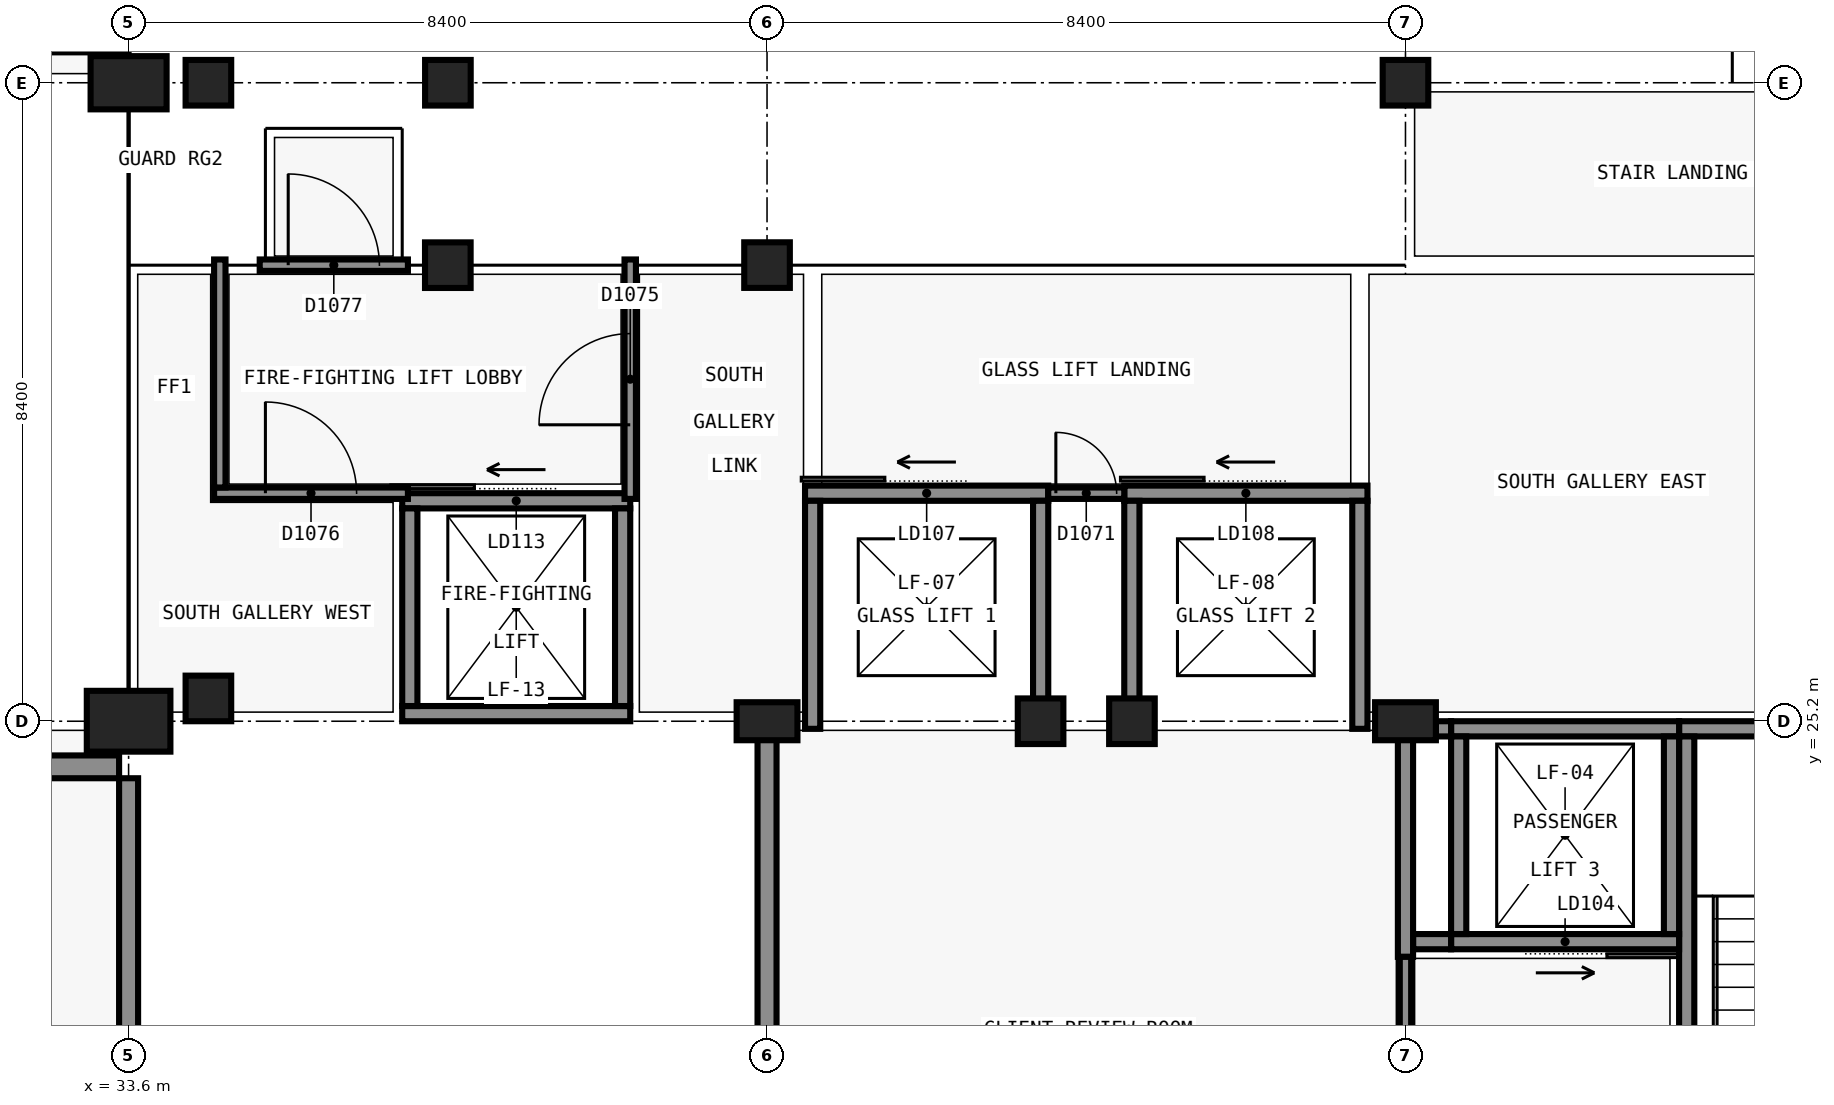
"""IFC4 building model, lengths in metres.
Left out: names, types, materials, properties, quantities, classifications, styles, units other than length and angle.
Written with IfcOpenShell. Run it as: python <this file> out.ifc"""

import sys

from ifc_helpers import new_model, si_unit, direction, frame, frame_2d, origin, origin_2d, place, context, subcontext, project, spatial, rectangle, extrude, element, fill, save


model = new_model("IFC4")
c1 = context("Model", 3, precision=1e-05, world=origin(), true_north=direction((0.0, 1.0)))
c2 = subcontext(c1, "Body", "Model", "MODEL_VIEW")
j1 = project(units=[si_unit("LENGTHUNIT", "METRE"), si_unit("PLANEANGLEUNIT", "RADIAN")], contexts=[c1])
p1 = place(None, origin())
s1 = spatial("IfcSite", under=j1, at=p1, CompositionType="ELEMENT")
p2 = place(p1, origin())
s2 = spatial("IfcBuilding", under=s1, at=p2, CompositionType="ELEMENT")
p3 = place(p2, frame((0.0, 0.0, 5.4)))
s3 = spatial("IfcBuildingStorey", under=s2, at=p3, CompositionType="ELEMENT", Elevation=5.4)
p4 = place(p3, frame((54.0, 25.1, 0.0), z_axis=(0.0, 0.0, 1.0), x_axis=(1.0, 0.0, 0.0)))
e1 = element("IfcWall", 1, at=p4, inside=s3, PredefinedType="SHEAR", context=c2, shape_type="SweptSolid", body=[
    extrude(rectangle(XDim=4.8, YDim=0.2, at=frame_2d((2.4, 0.0))), origin(), (0.0, 0.0, 1.0), 4.8),
])
p5 = place(p3, frame((54.1, 15.8, 0.0), z_axis=(0.0, 0.0, 1.0), x_axis=(0.0, 1.0, 0.0)))
e2 = element("IfcWall", 2, at=p5, inside=s3, PredefinedType="SHEAR", context=c2, shape_type="SweptSolid", body=[
    extrude(rectangle(XDim=9.2, YDim=0.2, at=frame_2d((4.6, 0.0))), origin(), (0.0, 0.0, 1.0), 4.8),
])
p6 = place(p5, frame((0.5, 0.0, 0.0)))
e3 = element("IfcOpeningElement", 3, at=p6, cuts=e2, PredefinedType="OPENING", context=c2, shape_type="SweptSolid", body=[
    extrude(rectangle(XDim=1.2, YDim=2.1, at=frame_2d((0.6, 1.05))), frame((0.0, 0.11, 0.0), z_axis=(0.0, -1.0, 0.0), x_axis=(1.0, 0.0, 0.0)), (0.0, 0.0, 1.0), 0.22),
])
p7 = place(p3, frame((54.0, 22.3, 0.0), z_axis=(0.0, 0.0, 1.0), x_axis=(-1.0, 0.0, 0.0)))
e4 = element("IfcWall", 4, at=p7, inside=s3, PredefinedType="SHEAR", context=c2, shape_type="SweptSolid", body=[
    extrude(rectangle(XDim=3.0, YDim=0.2, at=frame_2d((1.5, 0.0))), origin(), (0.0, 0.0, 1.0), 4.8),
])
p8 = place(p7, frame((0.95, 0.0, 0.0)))
e5 = element("IfcOpeningElement", 5, at=p8, cuts=e4, PredefinedType="OPENING", context=c2, shape_type="SweptSolid", body=[
    extrude(rectangle(XDim=1.1, YDim=2.1, at=frame_2d((0.55, 1.05))), frame((0.0, 0.11, 0.0), z_axis=(0.0, -1.0, 0.0), x_axis=(1.0, 0.0, 0.0)), (0.0, 0.0, 1.0), 0.22),
])
p9 = place(p3, frame((51.0, 25.1, 0.0), z_axis=(0.0, 0.0, 1.0), x_axis=(1.0, 0.0, 0.0)))
e6 = element("IfcWall", 6, at=p9, inside=s3, PredefinedType="SHEAR", context=c2, shape_type="SweptSolid", body=[
    extrude(rectangle(XDim=3.0, YDim=0.2, at=frame_2d((1.5, 0.0))), origin(), (0.0, 0.0, 1.0), 4.8),
])
for number, where, z_axis, x_axis in (
    (7, (51.1, 22.4, 0.0), (0.0, 0.0, 1.0), (0.0, 1.0, 0.0)),
    (8, (53.9, 25.0, 0.0), (0.0, 0.0, 1.0), (0.0, -1.0, 0.0)),
):
    element("IfcWall", number, at=place(p3, frame(where, z_axis=z_axis, x_axis=x_axis)), inside=s3, PredefinedType="SHEAR", context=c2, shape_type="SweptSolid", body=[
        extrude(rectangle(XDim=2.6, YDim=0.2, at=frame_2d((1.3, 0.0))), origin(), (0.0, 0.0, 1.0), 4.8),
    ])
p10 = place(p3, frame((40.2, 25.3, 0.0), z_axis=(0.0, 0.0, 1.0), x_axis=(-1.0, 0.0, 0.0)))
e9 = element("IfcWall", 9, at=p10, inside=s3, PredefinedType="SHEAR", context=c2, shape_type="SweptSolid", body=[
    extrude(rectangle(XDim=3.0, YDim=0.2, at=frame_2d((1.5, 0.0))), origin(), (0.0, 0.0, 1.0), 4.8),
])
p11 = place(p3, frame((37.2, 28.1, 0.0), z_axis=(0.0, 0.0, 1.0), x_axis=(1.0, 0.0, 0.0)))
e10 = element("IfcWall", 10, at=p11, inside=s3, PredefinedType="SHEAR", context=c2, shape_type="SweptSolid", body=[
    extrude(rectangle(XDim=3.0, YDim=0.2, at=frame_2d((1.5, 0.0))), origin(), (0.0, 0.0, 1.0), 4.8),
])
p12 = place(p11, frame((0.95, 0.0, 0.0)))
e11 = element("IfcOpeningElement", 11, at=p12, cuts=e10, PredefinedType="OPENING", context=c2, shape_type="SweptSolid", body=[
    extrude(rectangle(XDim=1.1, YDim=2.1, at=frame_2d((0.55, 1.05))), frame((0.0, 0.11, 0.0), z_axis=(0.0, -1.0, 0.0), x_axis=(1.0, 0.0, 0.0)), (0.0, 0.0, 1.0), 0.22),
])
for number, where, z_axis, x_axis in (
    (12, (37.3, 25.4, 0.0), (0.0, 0.0, 1.0), (0.0, 1.0, 0.0)),
    (13, (40.1, 28.0, 0.0), (0.0, 0.0, 1.0), (0.0, -1.0, 0.0)),
):
    element("IfcWall", number, at=place(p3, frame(where, z_axis=z_axis, x_axis=x_axis)), inside=s3, PredefinedType="SHEAR", context=c2, shape_type="SweptSolid", body=[
        extrude(rectangle(XDim=2.6, YDim=0.2, at=frame_2d((1.3, 0.0))), origin(), (0.0, 0.0, 1.0), 4.8),
    ])
p13 = place(p3, frame((33.6, 25.2, 0.0), z_axis=(0.0, 0.0, 1.0), x_axis=(1.0, 0.0, 0.0)))
e14 = element("IfcColumn", 14, at=p13, inside=s3, PredefinedType="COLUMN", context=c2, shape_type="SweptSolid", body=[
    extrude(rectangle(XDim=1.1, YDim=0.8, at=origin_2d()), origin(), (0.0, 0.0, 1.0), 4.8),
])
for number, where, z_axis, x_axis in (
    (15, (42.0, 25.2, 0.0), (0.0, 0.0, 1.0), (1.0, 0.0, 0.0)),
    (16, (50.4, 25.2, 0.0), (0.0, 0.0, 1.0), (1.0, 0.0, 0.0)),
):
    element("IfcColumn", number, at=place(p3, frame(where, z_axis=z_axis, x_axis=x_axis)), inside=s3, PredefinedType="COLUMN", context=c2, shape_type="SweptSolid", body=[
        extrude(rectangle(XDim=0.8, YDim=0.5, at=origin_2d()), origin(), (0.0, 0.0, 1.0), 4.8),
    ])
p14 = place(p3, frame((33.6, 33.6, 0.0), z_axis=(0.0, 0.0, 1.0), x_axis=(1.0, 0.0, 0.0)))
e17 = element("IfcColumn", 17, at=p14, inside=s3, PredefinedType="COLUMN", context=c2, shape_type="SweptSolid", body=[
    extrude(rectangle(XDim=1.0, YDim=0.7, at=origin_2d()), origin(), (0.0, 0.0, 1.0), 4.8),
])
for number, where, z_axis, x_axis in (
    (18, (50.4, 33.6, 0.0), (0.0, 0.0, 1.0), (1.0, 0.0, 0.0)),
    (19, (34.65, 25.5, 0.0), (0.0, 0.0, 1.0), (1.0, 0.0, 0.0)),
    (20, (34.65, 33.6, 0.0), (0.0, 0.0, 1.0), (1.0, 0.0, 0.0)),
):
    element("IfcColumn", number, at=place(p3, frame(where, z_axis=z_axis, x_axis=x_axis)), inside=s3, PredefinedType="COLUMN", context=c2, shape_type="SweptSolid", body=[
        extrude(rectangle(XDim=0.6, YDim=0.6, at=origin_2d()), origin(), (0.0, 0.0, 1.0), 4.8),
    ])
p15 = place(p3, frame((51.0, 22.3, 0.0), z_axis=(0.0, 0.0, 1.0), x_axis=(-1.0, 0.0, 0.0)))
e21 = element("IfcWall", 21, at=p15, inside=s3, PredefinedType="SHEAR", context=c2, shape_type="SweptSolid", body=[
    extrude(rectangle(XDim=0.5, YDim=0.2, at=frame_2d((0.25, 0.0))), origin(), (0.0, 0.0, 1.0), 4.8),
])
p16 = place(p3, frame((50.8, 25.1, 0.0), z_axis=(0.0, 0.0, 1.0), x_axis=(1.0, 0.0, 0.0)))
e22 = element("IfcWall", 22, at=p16, inside=s3, PredefinedType="SHEAR", context=c2, shape_type="SweptSolid", body=[
    extrude(rectangle(XDim=0.2, YDim=0.2, at=frame_2d((0.1, 0.0))), origin(), (0.0, 0.0, 1.0), 4.8),
])
for number, where, z_axis, x_axis in (
    (23, (37.8, 31.2, 0.0), (0.0, 0.0, 1.0), (1.0, 0.0, 0.0)),
    (24, (37.801, 33.6, 0.0), (0.0, 0.0, 1.0), (1.0, 0.0, 0.0)),
    (25, (45.599, 25.2, 0.0), (0.0, 0.0, 1.0), (1.0, 0.0, 0.0)),
    (26, (46.801, 25.2, 0.0), (0.0, 0.0, 1.0), (1.0, 0.0, 0.0)),
    (27, (42.0, 31.201, 0.0), (0.0, 0.0, 1.0), (1.0, 0.0, 0.0)),
):
    element("IfcColumn", number, at=place(p3, frame(where, z_axis=z_axis, x_axis=x_axis)), inside=s3, PredefinedType="COLUMN", context=c2, shape_type="SweptSolid", body=[
        extrude(rectangle(XDim=0.6, YDim=0.6, at=origin_2d()), origin(), (0.0, 0.0, 1.0), 4.8),
    ])
p17 = place(p3, frame((29.051, 24.6, 0.0), z_axis=(0.0, 0.0, 1.0), x_axis=(1.0, 0.0, 0.0)))
e28 = element("IfcWall", 28, at=p17, inside=s3, PredefinedType="SOLIDWALL", context=c2, shape_type="SweptSolid", body=[
    extrude(rectangle(XDim=4.425, YDim=0.3, at=frame_2d((2.212, 0.0))), origin(), (0.0, 0.0, 1.0), 4.5),
])
p18 = place(p17, frame((0.775, 0.0, 0.9)))
e29 = element("IfcOpeningElement", 29, at=p18, cuts=e28, PredefinedType="OPENING", context=c2, shape_type="SweptSolid", body=[
    extrude(rectangle(XDim=2.4, YDim=1.5, at=frame_2d((1.2, 0.75))), frame((0.0, 0.16, 0.0), z_axis=(0.0, -1.0, 0.0), x_axis=(1.0, 0.0, 0.0)), (0.0, 0.0, 1.0), 0.32),
])
p19 = place(p3, frame((33.6, 34.15, 0.0), z_axis=(0.0, 0.0, 1.0), x_axis=(-1.0, 0.0, 0.0)))
e30 = element("IfcWall", 30, at=p19, inside=s3, PredefinedType="SOLIDWALL", context=c2, shape_type="SweptSolid", body=[
    extrude(rectangle(XDim=4.536, YDim=0.3, at=frame_2d((2.268, 0.0))), origin(), (0.0, 0.0, 1.0), 4.5),
])
p20 = place(p19, frame((1.5, 0.0, 1.5)))
e31 = element("IfcOpeningElement", 31, at=p20, cuts=e30, PredefinedType="OPENING", context=c2, shape_type="SweptSolid", body=[
    extrude(rectangle(XDim=1.2, YDim=0.9, at=frame_2d((0.6, 0.45))), frame((0.0, 0.16, 0.0), z_axis=(0.0, -1.0, 0.0), x_axis=(1.0, 0.0, 0.0)), (0.0, 0.0, 1.0), 0.32),
])
p21 = place(p3, frame((33.6, 8.6, 0.0), z_axis=(0.0, 0.0, 1.0), x_axis=(0.0, 1.0, 0.0)))
e32 = element("IfcWall", 32, at=p21, inside=s3, PredefinedType="SOLIDWALL", context=c2, shape_type="SweptSolid", body=[
    extrude(rectangle(XDim=15.85, YDim=0.25, at=frame_2d((7.925, 0.0))), origin(), (0.0, 0.0, 1.0), 3.8),
])
p22 = place(p3, frame((42.0, 16.925, 0.0), z_axis=(0.0, 0.0, 1.0), x_axis=(0.0, 1.0, 0.0)))
e33 = element("IfcWall", 33, at=p22, inside=s3, PredefinedType="PARTITIONING", context=c2, shape_type="SweptSolid", body=[
    extrude(rectangle(XDim=8.4, YDim=0.25, at=frame_2d((4.2, 0.0))), origin(), (0.0, 0.0, 1.0), 3.8),
])
p23 = place(p3, frame((42.5, 28.2, 0.0), z_axis=(0.0, 0.0, 1.0), x_axis=(1.0, 0.0, 0.0)))
e34 = element("IfcWall", 34, at=p23, inside=s3, PredefinedType="SHEAR", context=c2, shape_type="SweptSolid", body=[
    extrude(rectangle(XDim=3.2, YDim=0.2, at=frame_2d((1.6, 0.0))), origin(), (0.0, 0.0, 1.0), 4.5),
])
p24 = place(p23, frame((1.05, 0.0, 0.0)))
e35 = element("IfcOpeningElement", 35, at=p24, cuts=e34, PredefinedType="OPENING", context=c2, shape_type="SweptSolid", body=[
    extrude(rectangle(XDim=1.1, YDim=2.1, at=frame_2d((0.55, 1.05))), frame((0.0, 0.11, 0.0), z_axis=(0.0, -1.0, 0.0), x_axis=(1.0, 0.0, 0.0)), (0.0, 0.0, 1.0), 0.22),
])
p25 = place(p3, frame((46.7, 28.2, 0.0), z_axis=(0.0, 0.0, 1.0), x_axis=(1.0, 0.0, 0.0)))
e36 = element("IfcWall", 36, at=p25, inside=s3, PredefinedType="SHEAR", context=c2, shape_type="SweptSolid", body=[
    extrude(rectangle(XDim=3.2, YDim=0.2, at=frame_2d((1.6, 0.0))), origin(), (0.0, 0.0, 1.0), 4.5),
])
p26 = place(p25, frame((1.05, 0.0, 0.0)))
e37 = element("IfcOpeningElement", 37, at=p26, cuts=e36, PredefinedType="OPENING", context=c2, shape_type="SweptSolid", body=[
    extrude(rectangle(XDim=1.1, YDim=2.1, at=frame_2d((0.55, 1.05))), frame((0.0, 0.11, 0.0), z_axis=(0.0, -1.0, 0.0), x_axis=(1.0, 0.0, 0.0)), (0.0, 0.0, 1.0), 0.22),
])
for number, where, z_axis, x_axis in (
    (38, (42.6, 25.1, 0.0), (0.0, 0.0, 1.0), (0.0, 1.0, 0.0)),
    (39, (45.6, 25.1, 0.0), (0.0, 0.0, 1.0), (0.0, 1.0, 0.0)),
    (40, (46.8, 25.1, 0.0), (0.0, 0.0, 1.0), (0.0, 1.0, 0.0)),
    (41, (49.8, 25.1, 0.0), (0.0, 0.0, 1.0), (0.0, 1.0, 0.0)),
):
    element("IfcWall", number, at=place(p3, frame(where, z_axis=z_axis, x_axis=x_axis)), inside=s3, PredefinedType="SHEAR", context=c2, shape_type="SweptSolid", body=[
        extrude(rectangle(XDim=3.0, YDim=0.2, at=frame_2d((1.5, 0.0))), origin(), (0.0, 0.0, 1.0), 4.5),
    ])
p27 = place(p3, frame((50.4, 22.1, 0.0), z_axis=(0.0, 0.0, 1.0), x_axis=(0.0, 1.0, 0.0)))
e42 = element("IfcWall", 42, at=p27, inside=s3, PredefinedType="SHEAR", context=c2, shape_type="SweptSolid", body=[
    extrude(rectangle(XDim=3.2, YDim=0.2, at=frame_2d((1.6, 0.0))), origin(), (0.0, 0.0, 1.0), 4.5),
])
p28 = place(p3, frame((34.725, 28.2, 0.0), z_axis=(0.0, 0.0, 1.0), x_axis=(1.0, 0.0, 0.0)))
e43 = element("IfcWall", 43, at=p28, inside=s3, PredefinedType="SOLIDWALL", context=c2, shape_type="SweptSolid", body=[
    extrude(rectangle(XDim=2.55, YDim=0.15, at=frame_2d((1.275, 0.0))), origin(), (0.0, 0.0, 1.0), 4.5),
])
p29 = place(p28, frame((0.675, 0.0, 0.0)))
e44 = element("IfcOpeningElement", 44, at=p29, cuts=e43, PredefinedType="OPENING", context=c2, shape_type="SweptSolid", body=[
    extrude(rectangle(XDim=1.2, YDim=2.1, at=frame_2d((0.6, 1.05))), frame((0.0, 0.085, 0.0), z_axis=(0.0, -1.0, 0.0), x_axis=(1.0, 0.0, 0.0)), (0.0, 0.0, 1.0), 0.17),
])
p30 = place(p3, frame((35.325, 31.2, 0.0), z_axis=(0.0, 0.0, 1.0), x_axis=(1.0, 0.0, 0.0)))
e45 = element("IfcWall", 45, at=p30, inside=s3, PredefinedType="SOLIDWALL", context=c2, shape_type="SweptSolid", body=[
    extrude(rectangle(XDim=1.95, YDim=0.15, at=frame_2d((0.975, 0.0))), origin(), (0.0, 0.0, 1.0), 4.5),
])
p31 = place(p30, frame((0.375, 0.0, 0.0)))
e46 = element("IfcOpeningElement", 46, at=p31, cuts=e45, PredefinedType="OPENING", context=c2, shape_type="SweptSolid", body=[
    extrude(rectangle(XDim=1.2, YDim=2.1, at=frame_2d((0.6, 1.05))), frame((0.0, 0.085, 0.0), z_axis=(0.0, -1.0, 0.0), x_axis=(1.0, 0.0, 0.0)), (0.0, 0.0, 1.0), 0.17),
])
p32 = place(p3, frame((45.7, 28.2, 0.0), z_axis=(0.0, 0.0, 1.0), x_axis=(1.0, 0.0, 0.0)))
e47 = element("IfcWall", 47, at=p32, inside=s3, PredefinedType="SOLIDWALL", context=c2, shape_type="SweptSolid", body=[
    extrude(rectangle(XDim=1.0, YDim=0.15, at=frame_2d((0.5, 0.0))), origin(), (0.0, 0.0, 1.0), 4.5),
])
p33 = place(p32, frame((0.1, 0.0, 0.0)))
e48 = element("IfcOpeningElement", 48, at=p33, cuts=e47, PredefinedType="OPENING", context=c2, shape_type="SweptSolid", body=[
    extrude(rectangle(XDim=0.8, YDim=2.1, at=frame_2d((0.4, 1.05))), frame((0.0, 0.085, 0.0), z_axis=(0.0, -1.0, 0.0), x_axis=(1.0, 0.0, 0.0)), (0.0, 0.0, 1.0), 0.17),
])
p34 = place(p3, frame((34.8, 28.275, 0.0), z_axis=(0.0, 0.0, 1.0), x_axis=(0.0, 1.0, 0.0)))
e49 = element("IfcWall", 49, at=p34, inside=s3, PredefinedType="SOLIDWALL", context=c2, shape_type="SweptSolid", body=[
    extrude(rectangle(XDim=3.0, YDim=0.15, at=frame_2d((1.5, 0.0))), origin(), (0.0, 0.0, 1.0), 4.5),
])
p35 = place(p3, frame((40.2, 28.125, 0.0), z_axis=(0.0, 0.0, 1.0), x_axis=(0.0, 1.0, 0.0)))
e50 = element("IfcWall", 50, at=p35, inside=s3, PredefinedType="SOLIDWALL", context=c2, shape_type="SweptSolid", body=[
    extrude(rectangle(XDim=3.15, YDim=0.15, at=frame_2d((1.575, 0.0))), origin(), (0.0, 0.0, 1.0), 4.0),
])
p36 = place(p35, frame((0.975, 0.0, 0.0)))
e51 = element("IfcOpeningElement", 51, at=p36, cuts=e50, PredefinedType="OPENING", context=c2, shape_type="SweptSolid", body=[
    extrude(rectangle(XDim=1.2, YDim=2.1, at=frame_2d((0.6, 1.05))), frame((0.0, 0.085, 0.0), z_axis=(0.0, -1.0, 0.0), x_axis=(1.0, 0.0, 0.0)), (0.0, 0.0, 1.0), 0.17),
])
p37 = place(p3, frame((50.4, 18.325, 0.0), z_axis=(0.0, 0.0, 1.0), x_axis=(0.0, 1.0, 0.0)))
e52 = element("IfcWall", 52, at=p37, inside=s3, PredefinedType="SOLIDWALL", context=c2, shape_type="SweptSolid", body=[
    extrude(rectangle(XDim=3.775, YDim=0.15, at=frame_2d((1.888, 0.0))), origin(), (0.0, 0.0, 1.0), 3.8),
])
p38 = place(p8, origin())
e53 = element("IfcDoor", 53, at=p38, inside=s3, OperationType="SLIDING_TO_LEFT", PredefinedType="DOOR", context=c2, shape_type="SweptSolid", body=[
    extrude(rectangle(XDim=1.1, YDim=2.1, at=frame_2d((0.55, 1.05))), frame((0.0, 0.025, 0.0), z_axis=(0.0, -1.0, 0.0), x_axis=(1.0, 0.0, 0.0)), (0.0, 0.0, 1.0), 0.05),
])
fill(e5, e53)
p39 = place(p24, origin())
e54 = element("IfcDoor", 54, at=p39, inside=s3, OperationType="SLIDING_TO_LEFT", PredefinedType="DOOR", context=c2, shape_type="SweptSolid", body=[
    extrude(rectangle(XDim=1.1, YDim=2.1, at=frame_2d((0.55, 1.05))), frame((0.0, 0.025, 0.0), z_axis=(0.0, -1.0, 0.0), x_axis=(1.0, 0.0, 0.0)), (0.0, 0.0, 1.0), 0.05),
])
fill(e35, e54)
p40 = place(p26, origin())
e55 = element("IfcDoor", 55, at=p40, inside=s3, OperationType="SLIDING_TO_LEFT", PredefinedType="DOOR", context=c2, shape_type="SweptSolid", body=[
    extrude(rectangle(XDim=1.1, YDim=2.1, at=frame_2d((0.55, 1.05))), frame((0.0, 0.025, 0.0), z_axis=(0.0, -1.0, 0.0), x_axis=(1.0, 0.0, 0.0)), (0.0, 0.0, 1.0), 0.05),
])
fill(e37, e55)
p41 = place(p12, origin())
e56 = element("IfcDoor", 56, at=p41, inside=s3, OperationType="SLIDING_TO_LEFT", PredefinedType="DOOR", context=c2, shape_type="SweptSolid", body=[
    extrude(rectangle(XDim=1.1, YDim=2.1, at=frame_2d((0.55, 1.05))), frame((0.0, 0.025, 0.0), z_axis=(0.0, -1.0, 0.0), x_axis=(1.0, 0.0, 0.0)), (0.0, 0.0, 1.0), 0.05),
])
fill(e11, e56)
p42 = place(p33, origin())
e57 = element("IfcDoor", 57, at=p42, inside=s3, OperationType="SINGLE_SWING_RIGHT", PredefinedType="DOOR", context=c2, shape_type="SweptSolid", body=[
    extrude(rectangle(XDim=0.8, YDim=2.1, at=frame_2d((0.4, 1.05))), frame((0.0, 0.025, 0.0), z_axis=(0.0, -1.0, 0.0), x_axis=(1.0, 0.0, 0.0)), (0.0, 0.0, 1.0), 0.05),
])
fill(e48, e57)
p43 = place(p36, origin())
e58 = element("IfcDoor", 58, at=p43, inside=s3, OperationType="SINGLE_SWING_RIGHT", PredefinedType="DOOR", context=c2, shape_type="SweptSolid", body=[
    extrude(rectangle(XDim=1.2, YDim=2.1, at=frame_2d((0.6, 1.05))), frame((0.0, 0.025, 0.0), z_axis=(0.0, -1.0, 0.0), x_axis=(1.0, 0.0, 0.0)), (0.0, 0.0, 1.0), 0.05),
])
fill(e51, e58)
p44 = place(p29, origin())
e59 = element("IfcDoor", 59, at=p44, inside=s3, OperationType="SINGLE_SWING_RIGHT", PredefinedType="DOOR", context=c2, shape_type="SweptSolid", body=[
    extrude(rectangle(XDim=1.2, YDim=2.1, at=frame_2d((0.6, 1.05))), frame((0.0, 0.025, 0.0), z_axis=(0.0, -1.0, 0.0), x_axis=(1.0, 0.0, 0.0)), (0.0, 0.0, 1.0), 0.05),
])
fill(e44, e59)
p45 = place(p31, origin())
e60 = element("IfcDoor", 60, at=p45, inside=s3, OperationType="SINGLE_SWING_LEFT", PredefinedType="DOOR", context=c2, shape_type="SweptSolid", body=[
    extrude(rectangle(XDim=1.2, YDim=2.1, at=frame_2d((0.6, 1.05))), frame((0.0, 0.025, 0.0), z_axis=(0.0, -1.0, 0.0), x_axis=(1.0, 0.0, 0.0)), (0.0, 0.0, 1.0), 0.05),
])
fill(e46, e60)
save(model, sys.argv[1])
